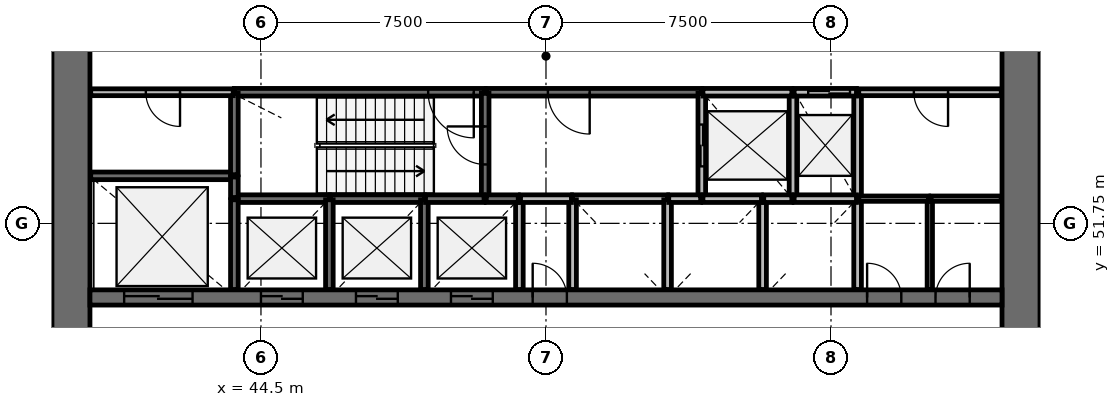
"""IFC4 building model, lengths in metres.
Left out: names, types, materials, properties, quantities, classifications, styles, units other than length and angle.
Written with IfcOpenShell. Run it as: python <this file> out.ifc"""

import sys

from ifc_helpers import new_model, si_unit, direction, frame, frame_2d, origin, place, context, subcontext, project, spatial, rectangle, extrude, source, transform, mapped, element, fill, save


model = new_model("IFC4")
c1 = context("Model", 3, precision=1e-05, world=origin(), true_north=direction((0.0, 1.0)))
c2 = subcontext(c1, "Body", "Model", "MODEL_VIEW")
j1 = project(units=[si_unit("LENGTHUNIT", "METRE"), si_unit("PLANEANGLEUNIT", "RADIAN")], contexts=[c1])
p1 = place(None, origin())
s1 = spatial("IfcSite", under=j1, at=p1, CompositionType="ELEMENT")
p2 = place(p1, origin())
s2 = spatial("IfcBuilding", under=s1, at=p2, CompositionType="ELEMENT")
p3 = place(p2, frame((0.0, 0.0, 9.4)))
s3 = spatial("IfcBuildingStorey", under=s2, at=p3, CompositionType="ELEMENT", Elevation=9.4)
p4 = place(p3, frame((64.5, 38.0, 0.0), z_axis=(0.0, 0.0, 1.0), x_axis=(0.0, 1.0, 0.0)))
e1 = element("IfcWall", 1, at=p4, inside=s3, PredefinedType="SHEAR", context=c2, shape_type="SweptSolid", body=[
    extrude(rectangle(XDim=20.0, YDim=1.0, at=frame_2d((10.0, 0.0))), origin(), (0.0, 0.0, 1.0), 4.4),
])
p5 = place(p4, frame((9.1, 0.0, 0.0)))
e2 = element("IfcOpeningElement", 2, at=p5, cuts=e1, PredefinedType="OPENING", context=c2, shape_type="SweptSolid", body=[
    extrude(rectangle(XDim=1.8, YDim=2.1, at=frame_2d((0.9, 1.05))), frame((0.0, 0.51, 0.0), z_axis=(0.0, -1.0, 0.0), x_axis=(1.0, 0.0, 0.0)), (0.0, 0.0, 1.0), 1.02),
])
p6 = place(p3, frame((39.5, 58.0, 0.0), z_axis=(0.0, 0.0, 1.0), x_axis=(0.0, -1.0, 0.0)))
e3 = element("IfcWall", 3, at=p6, inside=s3, PredefinedType="SHEAR", context=c2, shape_type="SweptSolid", body=[
    extrude(rectangle(XDim=20.0, YDim=1.0, at=frame_2d((10.0, 0.0))), origin(), (0.0, 0.0, 1.0), 4.4),
])
p7 = place(p6, frame((9.1, 0.0, 0.0)))
e4 = element("IfcOpeningElement", 4, at=p7, cuts=e3, PredefinedType="OPENING", context=c2, shape_type="SweptSolid", body=[
    extrude(rectangle(XDim=1.8, YDim=2.1, at=frame_2d((0.9, 1.05))), frame((0.0, 0.51, 0.0), z_axis=(0.0, -1.0, 0.0), x_axis=(1.0, 0.0, 0.0)), (0.0, 0.0, 1.0), 1.02),
])
p8 = place(p3, frame((40.0, 49.8, 0.0), z_axis=(0.0, 0.0, 1.0), x_axis=(1.0, 0.0, 0.0)))
e5 = element("IfcWall", 5, at=p8, inside=s3, PredefinedType="SHEAR", context=c2, shape_type="SweptSolid", body=[
    extrude(rectangle(XDim=24.0, YDim=0.4, at=frame_2d((12.0, 0.0))), origin(), (0.0, 0.0, 1.0), 4.4),
])
p9 = place(p8, frame((4.5, 0.0, 0.0)))
e6 = element("IfcOpeningElement", 6, at=p9, cuts=e5, PredefinedType="OPENING", context=c2, shape_type="SweptSolid", body=[
    extrude(rectangle(XDim=1.1, YDim=2.1, at=frame_2d((0.55, 1.05))), frame((0.0, 0.21, 0.0), z_axis=(0.0, -1.0, 0.0), x_axis=(1.0, 0.0, 0.0)), (0.0, 0.0, 1.0), 0.42),
])
p10 = place(p8, frame((7.0, 0.0, 0.0)))
e7 = element("IfcOpeningElement", 7, at=p10, cuts=e5, PredefinedType="OPENING", context=c2, shape_type="SweptSolid", body=[
    extrude(rectangle(XDim=1.1, YDim=2.1, at=frame_2d((0.55, 1.05))), frame((0.0, 0.21, 0.0), z_axis=(0.0, -1.0, 0.0), x_axis=(1.0, 0.0, 0.0)), (0.0, 0.0, 1.0), 0.42),
])
p11 = place(p8, frame((9.5, 0.0, 0.0)))
e8 = element("IfcOpeningElement", 8, at=p11, cuts=e5, PredefinedType="OPENING", context=c2, shape_type="SweptSolid", body=[
    extrude(rectangle(XDim=1.1, YDim=2.1, at=frame_2d((0.55, 1.05))), frame((0.0, 0.21, 0.0), z_axis=(0.0, -1.0, 0.0), x_axis=(1.0, 0.0, 0.0)), (0.0, 0.0, 1.0), 0.42),
])
p12 = place(p8, frame((0.9, 0.0, 0.0)))
e9 = element("IfcOpeningElement", 9, at=p12, cuts=e5, PredefinedType="OPENING", context=c2, shape_type="SweptSolid", body=[
    extrude(rectangle(XDim=1.8, YDim=2.4, at=frame_2d((0.9, 1.2))), frame((0.0, 0.21, 0.0), z_axis=(0.0, -1.0, 0.0), x_axis=(1.0, 0.0, 0.0)), (0.0, 0.0, 1.0), 0.42),
])
p13 = place(p8, frame((20.45, 0.0, 0.0)))
e10 = element("IfcOpeningElement", 10, at=p13, cuts=e5, PredefinedType="OPENING", context=c2, shape_type="SweptSolid", body=[
    extrude(rectangle(XDim=0.9, YDim=2.1, at=frame_2d((0.45, 1.05))), frame((0.0, 0.21, 0.0), z_axis=(0.0, -1.0, 0.0), x_axis=(1.0, 0.0, 0.0)), (0.0, 0.0, 1.0), 0.42),
])
p14 = place(p8, frame((22.25, 0.0, 0.0)))
e11 = element("IfcOpeningElement", 11, at=p14, cuts=e5, PredefinedType="OPENING", context=c2, shape_type="SweptSolid", body=[
    extrude(rectangle(XDim=0.9, YDim=2.1, at=frame_2d((0.45, 1.05))), frame((0.0, 0.21, 0.0), z_axis=(0.0, -1.0, 0.0), x_axis=(1.0, 0.0, 0.0)), (0.0, 0.0, 1.0), 0.42),
])
p15 = place(p8, frame((11.65, 0.0, 0.0)))
e12 = element("IfcOpeningElement", 12, at=p15, cuts=e5, PredefinedType="OPENING", context=c2, shape_type="SweptSolid", body=[
    extrude(rectangle(XDim=0.9, YDim=2.1, at=frame_2d((0.45, 1.05))), frame((0.0, 0.21, 0.0), z_axis=(0.0, -1.0, 0.0), x_axis=(1.0, 0.0, 0.0)), (0.0, 0.0, 1.0), 0.42),
])
p16 = place(p3, frame((50.4, 55.2, 0.0), z_axis=(0.0, 0.0, 1.0), x_axis=(-1.0, 0.0, 0.0)))
e13 = element("IfcWall", 13, at=p16, inside=s3, PredefinedType="SOLIDWALL", context=c2, shape_type="SweptSolid", body=[
    extrude(rectangle(XDim=6.6, YDim=0.2, at=frame_2d((3.3, 0.0))), origin(), (0.0, 0.0, 1.0), 3.95),
])
p17 = place(p16, frame((0.3, 0.0, 0.0)))
e14 = element("IfcOpeningElement", 14, at=p17, cuts=e13, PredefinedType="OPENING", context=c2, shape_type="SweptSolid", body=[
    extrude(rectangle(XDim=1.2, YDim=2.1, at=frame_2d((0.6, 1.05))), frame((0.0, 0.11, 0.0), z_axis=(0.0, -1.0, 0.0), x_axis=(1.0, 0.0, 0.0)), (0.0, 0.0, 1.0), 0.22),
])
p18 = place(p3, frame((56.1, 55.2, 0.0), z_axis=(0.0, 0.0, 1.0), x_axis=(-1.0, 0.0, 0.0)))
e15 = element("IfcWall", 15, at=p18, inside=s3, PredefinedType="SOLIDWALL", context=c2, shape_type="SweptSolid", body=[
    extrude(rectangle(XDim=5.67, YDim=0.2, at=frame_2d((2.835, 0.0))), origin(), (0.0, 0.0, 1.0), 3.95),
])
p19 = place(p18, frame((2.95, 0.0, 0.0)))
e16 = element("IfcOpeningElement", 16, at=p19, cuts=e15, PredefinedType="OPENING", context=c2, shape_type="SweptSolid", body=[
    extrude(rectangle(XDim=1.1, YDim=2.1, at=frame_2d((0.55, 1.05))), frame((0.0, 0.11, 0.0), z_axis=(0.0, -1.0, 0.0), x_axis=(1.0, 0.0, 0.0)), (0.0, 0.0, 1.0), 0.22),
])
p20 = place(p3, frame((43.8, 53.0, 0.0), z_axis=(0.0, 0.0, 1.0), x_axis=(-1.0, 0.0, 0.0)))
e17 = element("IfcWall", 17, at=p20, inside=s3, PredefinedType="SOLIDWALL", context=c2, shape_type="SweptSolid", body=[
    extrude(rectangle(XDim=3.78, YDim=0.2, at=frame_2d((1.89, 0.0))), origin(), (0.0, 0.0, 1.0), 3.95),
])
p21 = place(p3, frame((50.4, 52.4, 0.0), z_axis=(0.0, 0.0, 1.0), x_axis=(0.0, 1.0, 0.0)))
e18 = element("IfcWall", 18, at=p21, inside=s3, PredefinedType="SOLIDWALL", context=c2, shape_type="SweptSolid", body=[
    extrude(rectangle(XDim=2.77, YDim=0.2, at=frame_2d((1.385, 0.0))), origin(), (0.0, 0.0, 1.0), 3.95),
])
p22 = place(p21, frame((0.9, 0.0, 0.0)))
e19 = element("IfcOpeningElement", 19, at=p22, cuts=e18, PredefinedType="OPENING", context=c2, shape_type="SweptSolid", body=[
    extrude(rectangle(XDim=1.0, YDim=2.1, at=frame_2d((0.5, 1.05))), frame((0.0, 0.11, 0.0), z_axis=(0.0, -1.0, 0.0), x_axis=(1.0, 0.0, 0.0)), (0.0, 0.0, 1.0), 0.22),
])
p23 = place(p3, frame((56.1, 55.17, 0.0), z_axis=(0.0, 0.0, 1.0), x_axis=(0.0, -1.0, 0.0)))
e20 = element("IfcWall", 20, at=p23, inside=s3, PredefinedType="SOLIDWALL", context=c2, shape_type="SweptSolid", body=[
    extrude(rectangle(XDim=2.77, YDim=0.2, at=frame_2d((1.385, 0.0))), origin(), (0.0, 0.0, 1.0), 3.95),
])
p24 = place(p23, frame((0.82, 0.0, 0.0)))
e21 = element("IfcOpeningElement", 21, at=p24, cuts=e20, PredefinedType="OPENING", context=c2, shape_type="SweptSolid", body=[
    extrude(rectangle(XDim=1.1, YDim=2.1, at=frame_2d((0.55, 1.05))), frame((0.0, 0.11, 0.0), z_axis=(0.0, -1.0, 0.0), x_axis=(1.0, 0.0, 0.0)), (0.0, 0.0, 1.0), 0.22),
])
for number, where, z_axis, x_axis in (
    (22, (58.5, 52.4, 0.0), (0.0, 0.0, 1.0), (0.0, 1.0, 0.0)),
    (23, (60.2, 52.4, 0.0), (0.0, 0.0, 1.0), (0.0, 1.0, 0.0)),
):
    element("IfcWall", number, at=place(p3, frame(where, z_axis=z_axis, x_axis=x_axis)), inside=s3, PredefinedType="SOLIDWALL", context=c2, shape_type="SweptSolid", body=[
        extrude(rectangle(XDim=2.8, YDim=0.2, at=frame_2d((1.4, 0.0))), origin(), (0.0, 0.0, 1.0), 3.95),
    ])
p25 = place(p3, frame((46.3, 52.4, 0.0), z_axis=(0.0, 0.0, 1.0), x_axis=(-1.0, 0.0, 0.0)))
e24 = element("IfcWall", 24, at=p25, inside=s3, PredefinedType="SOLIDWALL", context=c2, shape_type="SweptSolid", body=[
    extrude(rectangle(XDim=2.5, YDim=0.2, at=frame_2d((1.25, 0.0))), origin(), (0.0, 0.0, 1.0), 3.95),
])
p26 = place(p3, frame((48.8, 52.4, 0.0), z_axis=(0.0, 0.0, 1.0), x_axis=(-1.0, 0.0, 0.0)))
e25 = element("IfcWall", 25, at=p26, inside=s3, PredefinedType="SOLIDWALL", context=c2, shape_type="SweptSolid", body=[
    extrude(rectangle(XDim=2.47, YDim=0.2, at=frame_2d((1.235, 0.0))), origin(), (0.0, 0.0, 1.0), 3.95),
])
p27 = place(p3, frame((55.2, 52.4, 0.0), z_axis=(0.0, 0.0, 1.0), x_axis=(-1.0, 0.0, 0.0)))
e26 = element("IfcWall", 26, at=p27, inside=s3, PredefinedType="SOLIDWALL", context=c2, shape_type="SweptSolid", body=[
    extrude(rectangle(XDim=2.5, YDim=0.2, at=frame_2d((1.25, 0.0))), origin(), (0.0, 0.0, 1.0), 3.95),
])
p28 = place(p3, frame((58.47, 55.2, 0.0), z_axis=(0.0, 0.0, 1.0), x_axis=(-1.0, 0.0, 0.0)))
e27 = element("IfcWall", 27, at=p28, inside=s3, PredefinedType="SOLIDWALL", context=c2, shape_type="SweptSolid", body=[
    extrude(rectangle(XDim=2.34, YDim=0.2, at=frame_2d((1.17, 0.0))), origin(), (0.0, 0.0, 1.0), 3.95),
])
for number, where, z_axis, x_axis in (
    (28, (43.8, 52.37, 0.0), (0.0, 0.0, 1.0), (0.0, -1.0, 0.0)),
    (29, (46.3, 50.01, 0.0), (0.0, 0.0, 1.0), (0.0, 1.0, 0.0)),
    (30, (48.8, 50.01, 0.0), (0.0, 0.0, 1.0), (0.0, 1.0, 0.0)),
):
    element("IfcWall", number, at=place(p3, frame(where, z_axis=z_axis, x_axis=x_axis)), inside=s3, PredefinedType="SOLIDWALL", context=c2, shape_type="SweptSolid", body=[
        extrude(rectangle(XDim=2.36, YDim=0.2, at=frame_2d((1.18, 0.0))), origin(), (0.0, 0.0, 1.0), 3.95),
    ])
p29 = place(p3, frame((51.3, 50.01, 0.0), z_axis=(0.0, 0.0, 1.0), x_axis=(0.0, 1.0, 0.0)))
e31 = element("IfcWall", 31, at=p29, inside=s3, PredefinedType="SOLIDWALL", context=c2, shape_type="SweptSolid", body=[
    extrude(rectangle(XDim=2.39, YDim=0.2, at=frame_2d((1.195, 0.0))), origin(), (0.0, 0.0, 1.0), 3.95),
])
for number, where, z_axis, x_axis in (
    (32, (52.7, 52.37, 0.0), (0.0, 0.0, 1.0), (0.0, -1.0, 0.0)),
    (33, (55.2, 50.01, 0.0), (0.0, 0.0, 1.0), (0.0, 1.0, 0.0)),
):
    element("IfcWall", number, at=place(p3, frame(where, z_axis=z_axis, x_axis=x_axis)), inside=s3, PredefinedType="SOLIDWALL", context=c2, shape_type="SweptSolid", body=[
        extrude(rectangle(XDim=2.36, YDim=0.2, at=frame_2d((1.18, 0.0))), origin(), (0.0, 0.0, 1.0), 3.95),
    ])
p30 = place(p3, frame((57.7, 50.01, 0.0), z_axis=(0.0, 0.0, 1.0), x_axis=(0.0, 1.0, 0.0)))
e34 = element("IfcWall", 34, at=p30, inside=s3, PredefinedType="SOLIDWALL", context=c2, shape_type="SweptSolid", body=[
    extrude(rectangle(XDim=2.39, YDim=0.2, at=frame_2d((1.195, 0.0))), origin(), (0.0, 0.0, 1.0), 3.95),
])
p31 = place(p3, frame((60.2, 50.01, 0.0), z_axis=(0.0, 0.0, 1.0), x_axis=(0.0, 1.0, 0.0)))
e35 = element("IfcWall", 35, at=p31, inside=s3, PredefinedType="SOLIDWALL", context=c2, shape_type="SweptSolid", body=[
    extrude(rectangle(XDim=2.36, YDim=0.2, at=frame_2d((1.18, 0.0))), origin(), (0.0, 0.0, 1.0), 3.95),
])
p32 = place(p3, frame((43.8, 55.17, 0.0), z_axis=(0.0, 0.0, 1.0), x_axis=(0.0, -1.0, 0.0)))
e36 = element("IfcWall", 36, at=p32, inside=s3, PredefinedType="SOLIDWALL", context=c2, shape_type="SweptSolid", body=[
    extrude(rectangle(XDim=2.14, YDim=0.2, at=frame_2d((1.07, 0.0))), origin(), (0.0, 0.0, 1.0), 3.95),
])
p33 = place(p3, frame((60.17, 52.4, 0.0), z_axis=(0.0, 0.0, 1.0), x_axis=(-1.0, 0.0, 0.0)))
e37 = element("IfcWall", 37, at=p33, inside=s3, PredefinedType="SOLIDWALL", context=c2, shape_type="SweptSolid", body=[
    extrude(rectangle(XDim=1.64, YDim=0.2, at=frame_2d((0.82, 0.0))), origin(), (0.0, 0.0, 1.0), 3.95),
])
p34 = place(p3, frame((60.17, 55.2, 0.0), z_axis=(0.0, 0.0, 1.0), x_axis=(-1.0, 0.0, 0.0)))
e38 = element("IfcWall", 38, at=p34, inside=s3, PredefinedType="SOLIDWALL", context=c2, shape_type="SweptSolid", body=[
    extrude(rectangle(XDim=1.64, YDim=0.2, at=frame_2d((0.82, 0.0))), origin(), (0.0, 0.0, 1.0), 3.95),
])
p35 = place(p34, frame((0.17, 0.0, 0.0)))
e39 = element("IfcOpeningElement", 39, at=p35, cuts=e38, PredefinedType="OPENING", context=c2, shape_type="SweptSolid", body=[
    extrude(rectangle(XDim=1.1, YDim=2.1, at=frame_2d((0.55, 1.05))), frame((0.0, 0.11, 0.0), z_axis=(0.0, -1.0, 0.0), x_axis=(1.0, 0.0, 0.0)), (0.0, 0.0, 1.0), 0.22),
])
for number, where, z_axis, x_axis in (
    (40, (50.37, 52.4, 0.0), (0.0, 0.0, 1.0), (-1.0, 0.0, 0.0)),
    (41, (57.67, 52.4, 0.0), (0.0, 0.0, 1.0), (-1.0, 0.0, 0.0)),
):
    element("IfcWall", number, at=place(p3, frame(where, z_axis=z_axis, x_axis=x_axis)), inside=s3, PredefinedType="SOLIDWALL", context=c2, shape_type="SweptSolid", body=[
        extrude(rectangle(XDim=1.54, YDim=0.2, at=frame_2d((0.77, 0.0))), origin(), (0.0, 0.0, 1.0), 3.95),
    ])
p36 = place(p3, frame((51.33, 52.4, 0.0), z_axis=(0.0, 0.0, 1.0), x_axis=(1.0, 0.0, 0.0)))
e42 = element("IfcWall", 42, at=p36, inside=s3, PredefinedType="SOLIDWALL", context=c2, shape_type="SweptSolid", body=[
    extrude(rectangle(XDim=1.34, YDim=0.2, at=frame_2d((0.67, 0.0))), origin(), (0.0, 0.0, 1.0), 3.95),
])
for number, where, z_axis, x_axis in (
    (43, (51.27, 52.4, 0.0), (0.0, 0.0, 1.0), (-1.0, 0.0, 0.0)),
    (44, (56.07, 52.4, 0.0), (0.0, 0.0, 1.0), (-1.0, 0.0, 0.0)),
):
    element("IfcWall", number, at=place(p3, frame(where, z_axis=z_axis, x_axis=x_axis)), inside=s3, PredefinedType="SOLIDWALL", context=c2, shape_type="SweptSolid", body=[
        extrude(rectangle(XDim=0.84, YDim=0.2, at=frame_2d((0.42, 0.0))), origin(), (0.0, 0.0, 1.0), 3.95),
    ])
p37 = place(p3, frame((58.47, 52.4, 0.0), z_axis=(0.0, 0.0, 1.0), x_axis=(-1.0, 0.0, 0.0)))
e45 = element("IfcWall", 45, at=p37, inside=s3, PredefinedType="SOLIDWALL", context=c2, shape_type="SweptSolid", body=[
    extrude(rectangle(XDim=0.74, YDim=0.2, at=frame_2d((0.37, 0.0))), origin(), (0.0, 0.0, 1.0), 3.95),
])
p38 = place(p3, frame((43.8, 52.43, 0.0), z_axis=(0.0, 0.0, 1.0), x_axis=(0.0, 1.0, 0.0)))
e46 = element("IfcWall", 46, at=p38, inside=s3, PredefinedType="SOLIDWALL", context=c2, shape_type="SweptSolid", body=[
    extrude(rectangle(XDim=0.54, YDim=0.2, at=frame_2d((0.27, 0.0))), origin(), (0.0, 0.0, 1.0), 3.95),
])
p39 = place(p3, frame((43.77, 55.2, 0.0), z_axis=(0.0, 0.0, 1.0), x_axis=(-1.0, 0.0, 0.0)))
e47 = element("IfcWall", 47, at=p39, inside=s3, PredefinedType="PARTITIONING", context=c2, shape_type="SweptSolid", body=[
    extrude(rectangle(XDim=3.75, YDim=0.18, at=frame_2d((1.875, 0.0))), origin(), (0.0, 0.0, 1.0), 3.95),
])
p40 = place(p39, frame((1.4, 0.0, 0.0)))
e48 = element("IfcOpeningElement", 48, at=p40, cuts=e47, PredefinedType="OPENING", context=c2, shape_type="SweptSolid", body=[
    extrude(rectangle(XDim=0.9, YDim=2.1, at=frame_2d((0.45, 1.05))), frame((0.0, 0.1, 0.0), z_axis=(0.0, -1.0, 0.0), x_axis=(1.0, 0.0, 0.0)), (0.0, 0.0, 1.0), 0.2),
])
p41 = place(p3, frame((63.98, 55.2, 0.0), z_axis=(0.0, 0.0, 1.0), x_axis=(-1.0, 0.0, 0.0)))
e49 = element("IfcWall", 49, at=p41, inside=s3, PredefinedType="PARTITIONING", context=c2, shape_type="SweptSolid", body=[
    extrude(rectangle(XDim=3.75, YDim=0.18, at=frame_2d((1.875, 0.0))), origin(), (0.0, 0.0, 1.0), 3.95),
])
p42 = place(p41, frame((1.4, 0.0, 0.0)))
e50 = element("IfcOpeningElement", 50, at=p42, cuts=e49, PredefinedType="OPENING", context=c2, shape_type="SweptSolid", body=[
    extrude(rectangle(XDim=0.9, YDim=2.1, at=frame_2d((0.45, 1.05))), frame((0.0, 0.1, 0.0), z_axis=(0.0, -1.0, 0.0), x_axis=(1.0, 0.0, 0.0)), (0.0, 0.0, 1.0), 0.2),
])
p43 = place(p3, frame((62.1, 50.01, 0.0), z_axis=(0.0, 0.0, 1.0), x_axis=(0.0, 1.0, 0.0)))
e51 = element("IfcWall", 51, at=p43, inside=s3, PredefinedType="PARTITIONING", context=c2, shape_type="SweptSolid", body=[
    extrude(rectangle(XDim=2.39, YDim=0.14, at=frame_2d((1.195, 0.0))), origin(), (0.0, 0.0, 1.0), 3.15),
])
p44 = place(p3, frame((62.07, 52.4, 0.0), z_axis=(0.0, 0.0, 1.0), x_axis=(-1.0, 0.0, 0.0)))
e52 = element("IfcWall", 52, at=p44, inside=s3, PredefinedType="PARTITIONING", context=c2, shape_type="SweptSolid", body=[
    extrude(rectangle(XDim=1.84, YDim=0.14, at=frame_2d((0.92, 0.0))), origin(), (0.0, 0.0, 1.0), 3.15),
])
p45 = place(p3, frame((63.98, 52.4, 0.0), z_axis=(0.0, 0.0, 1.0), x_axis=(-1.0, 0.0, 0.0)))
e53 = element("IfcWall", 53, at=p45, inside=s3, PredefinedType="PARTITIONING", context=c2, shape_type="SweptSolid", body=[
    extrude(rectangle(XDim=1.85, YDim=0.14, at=frame_2d((0.925, 0.0))), origin(), (0.0, 0.0, 1.0), 3.15),
])
m1 = source(origin(), c2, "Body", "SweptSolid", [
    extrude(rectangle(XDim=1.1, YDim=2.1, at=frame_2d((0.55, 1.05))), frame((0.0, 0.025, 0.0), z_axis=(0.0, -1.0, 0.0), x_axis=(1.0, 0.0, 0.0)), (0.0, 0.0, 1.0), 0.05),
])
p46 = place(p9, origin())
e54 = element("IfcDoor", 54, at=p46, inside=s3, OperationType="DOUBLE_DOOR_SLIDING", PredefinedType="USERDEFINED", context=c2, shape_type="MappedRepresentation", body=[
    mapped(m1, transform((0.0, 0.0, 0.0), scale=1.0)),
])
fill(e6, e54)
p47 = place(p10, origin())
e55 = element("IfcDoor", 55, at=p47, inside=s3, OperationType="DOUBLE_DOOR_SLIDING", PredefinedType="USERDEFINED", context=c2, shape_type="MappedRepresentation", body=[
    mapped(m1, transform((0.0, 0.0, 0.0), scale=1.0)),
])
fill(e7, e55)
p48 = place(p11, origin())
e56 = element("IfcDoor", 56, at=p48, inside=s3, OperationType="DOUBLE_DOOR_SLIDING", PredefinedType="USERDEFINED", context=c2, shape_type="MappedRepresentation", body=[
    mapped(m1, transform((0.0, 0.0, 0.0), scale=1.0)),
])
fill(e8, e56)
p49 = place(p24, origin())
e57 = element("IfcDoor", 57, at=p49, inside=s3, OperationType="DOUBLE_DOOR_SLIDING", PredefinedType="USERDEFINED", context=c2, shape_type="MappedRepresentation", body=[
    mapped(m1, transform((0.0, 0.0, 0.0), scale=1.0)),
])
fill(e21, e57)
p50 = place(p35, origin())
e58 = element("IfcDoor", 58, at=p50, inside=s3, OperationType="DOUBLE_DOOR_SLIDING", PredefinedType="USERDEFINED", context=c2, shape_type="MappedRepresentation", body=[
    mapped(m1, transform((0.0, 0.0, 0.0), scale=1.0)),
])
fill(e39, e58)
m2 = source(origin(), c2, "Body", "SweptSolid", [
    extrude(rectangle(XDim=1.8, YDim=2.4, at=frame_2d((0.9, 1.2))), frame((0.0, 0.025, 0.0), z_axis=(0.0, -1.0, 0.0), x_axis=(1.0, 0.0, 0.0)), (0.0, 0.0, 1.0), 0.05),
])
p51 = place(p12, origin())
e59 = element("IfcDoor", 59, at=p51, inside=s3, OperationType="DOUBLE_DOOR_SLIDING", PredefinedType="USERDEFINED", context=c2, shape_type="MappedRepresentation", body=[
    mapped(m2, transform((0.0, 0.0, 0.0), scale=1.0)),
])
fill(e9, e59)
m3 = source(origin(), c2, "Body", "SweptSolid", [
    extrude(rectangle(XDim=1.2, YDim=2.1, at=frame_2d((0.6, 1.05))), frame((0.0, 0.025, 0.0), z_axis=(0.0, -1.0, 0.0), x_axis=(1.0, 0.0, 0.0)), (0.0, 0.0, 1.0), 0.05),
])
p52 = place(p17, origin())
e60 = element("IfcDoor", 60, at=p52, inside=s3, OperationType="SINGLE_SWING_LEFT", PredefinedType="DOOR", context=c2, shape_type="MappedRepresentation", body=[
    mapped(m3, transform((0.0, 0.0, 0.0), scale=1.0)),
])
fill(e14, e60)
m4 = source(origin(), c2, "Body", "SweptSolid", [
    extrude(rectangle(XDim=1.0, YDim=2.1, at=frame_2d((0.5, 1.05))), frame((0.0, 0.025, 0.0), z_axis=(0.0, -1.0, 0.0), x_axis=(1.0, 0.0, 0.0)), (0.0, 0.0, 1.0), 0.05),
])
p53 = place(p22, origin())
e61 = element("IfcDoor", 61, at=p53, inside=s3, OperationType="SINGLE_SWING_RIGHT", PredefinedType="DOOR", context=c2, shape_type="MappedRepresentation", body=[
    mapped(m4, transform((0.0, 0.0, 0.0), scale=1.0)),
])
fill(e19, e61)
m5 = source(origin(), c2, "Body", "SweptSolid", [
    extrude(rectangle(XDim=1.1, YDim=2.1, at=frame_2d((0.55, 1.05))), frame((0.0, 0.025, 0.0), z_axis=(0.0, -1.0, 0.0), x_axis=(1.0, 0.0, 0.0)), (0.0, 0.0, 1.0), 0.05),
])
p54 = place(p19, origin())
e62 = element("IfcDoor", 62, at=p54, inside=s3, OperationType="SINGLE_SWING_LEFT", PredefinedType="DOOR", context=c2, shape_type="MappedRepresentation", body=[
    mapped(m5, transform((0.0, 0.0, 0.0), scale=1.0)),
])
fill(e16, e62)
m6 = source(origin(), c2, "Body", "SweptSolid", [
    extrude(rectangle(XDim=0.9, YDim=2.1, at=frame_2d((0.45, 1.05))), frame((0.0, 0.025, 0.0), z_axis=(0.0, -1.0, 0.0), x_axis=(1.0, 0.0, 0.0)), (0.0, 0.0, 1.0), 0.05),
])
p55 = place(p40, origin())
e63 = element("IfcDoor", 63, at=p55, inside=s3, OperationType="SINGLE_SWING_LEFT", PredefinedType="DOOR", context=c2, shape_type="MappedRepresentation", body=[
    mapped(m6, transform((0.0, 0.0, 0.0), scale=1.0)),
])
fill(e48, e63)
p56 = place(p13, origin())
e64 = element("IfcDoor", 64, at=p56, inside=s3, OperationType="SINGLE_SWING_LEFT", PredefinedType="DOOR", context=c2, shape_type="MappedRepresentation", body=[
    mapped(m6, transform((0.0, 0.0, 0.0), scale=1.0)),
])
fill(e10, e64)
p57 = place(p14, origin())
e65 = element("IfcDoor", 65, at=p57, inside=s3, OperationType="SINGLE_SWING_RIGHT", PredefinedType="DOOR", context=c2, shape_type="MappedRepresentation", body=[
    mapped(m6, transform((0.0, 0.0, 0.0), scale=1.0)),
])
fill(e11, e65)
p58 = place(p42, origin())
e66 = element("IfcDoor", 66, at=p58, inside=s3, OperationType="SINGLE_SWING_LEFT", PredefinedType="DOOR", context=c2, shape_type="MappedRepresentation", body=[
    mapped(m6, transform((0.0, 0.0, 0.0), scale=1.0)),
])
fill(e50, e66)
p59 = place(p15, origin())
e67 = element("IfcDoor", 67, at=p59, inside=s3, OperationType="SINGLE_SWING_LEFT", PredefinedType="DOOR", context=c2, shape_type="MappedRepresentation", body=[
    mapped(m6, transform((0.0, 0.0, 0.0), scale=1.0)),
])
fill(e12, e67)
save(model, sys.argv[1])
